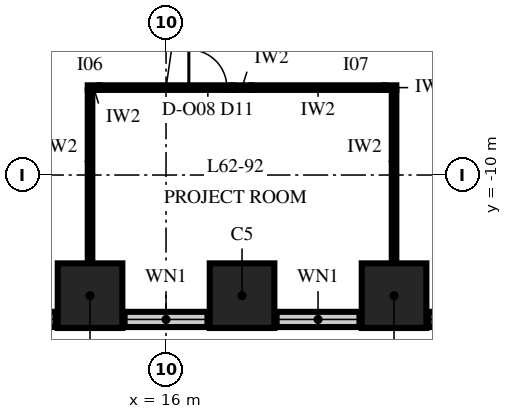
"""IFC4 building model, lengths in metres.
Left out: names, types, materials, properties, quantities, classifications, styles, units other than length and angle.
Written with IfcOpenShell. Run it as: python <this file> out.ifc"""

import sys

from ifc_helpers import new_model, si_unit, direction, frame, frame_2d, origin, origin_2d, place, context, subcontext, project, spatial, rectangle, extrude, element, fill, save


model = new_model("IFC4")
c1 = context("Model", 3, precision=1e-05, world=origin(), true_north=direction((0.0, 1.0)))
c2 = subcontext(c1, "Body", "Model", "MODEL_VIEW")
j1 = project(units=[si_unit("LENGTHUNIT", "METRE"), si_unit("PLANEANGLEUNIT", "RADIAN")], contexts=[c1])
p1 = place(None, origin())
s1 = spatial("IfcSite", under=j1, at=p1, CompositionType="ELEMENT")
p2 = place(p1, origin())
s2 = spatial("IfcBuilding", under=s1, at=p2, CompositionType="ELEMENT")
p3 = place(p2, frame((0.0, 0.0, 268.0)))
s3 = spatial("IfcBuildingStorey", under=s2, at=p3, CompositionType="ELEMENT", Elevation=268.0)
for number, where, z_axis, x_axis in (
    (1, (14.0, -13.175, 0.0), (0.0, 0.0, 1.0), (1.0, 0.0, 0.0)),
    (2, (18.0, -13.175, 0.0), (0.0, 0.0, 1.0), (1.0, 0.0, 0.0)),
    (3, (22.0, -13.175, 0.0), (0.0, 0.0, 1.0), (1.0, 0.0, 0.0)),
):
    element("IfcColumn", number, at=place(p3, frame(where, z_axis=z_axis, x_axis=x_axis)), inside=s3, PredefinedType="COLUMN", context=c2, shape_type="SweptSolid", body=[
        extrude(rectangle(XDim=1.7, YDim=1.7, at=origin_2d()), origin(), (0.0, 0.0, 1.0), 3.75),
    ])
p4 = place(p3, frame((-26.0, -13.8, 0.0), z_axis=(0.0, 0.0, 1.0), x_axis=(1.0, 0.0, 0.0)))
e4 = element("IfcWall", 4, at=p4, inside=s3, PredefinedType="SOLIDWALL", context=c2, shape_type="SweptSolid", body=[
    extrude(rectangle(XDim=52.0, YDim=0.4, at=frame_2d((26.0, 0.0))), origin(), (0.0, 0.0, 1.0), 2.0),
])
p5 = place(p4, frame((0.95, 0.0, 0.8)))
e5 = element("IfcOpeningElement", 5, at=p5, cuts=e4, PredefinedType="OPENING", context=c2, shape_type="SweptSolid", body=[
    extrude(rectangle(XDim=2.1, YDim=1.15, at=frame_2d((1.05, 0.575))), frame((0.0, 0.215, 0.0), z_axis=(0.0, -1.0, 0.0), x_axis=(1.0, 0.0, 0.0)), (0.0, 0.0, 1.0), 0.43),
])
p6 = place(p4, frame((4.95, 0.0, 0.8)))
e6 = element("IfcOpeningElement", 6, at=p6, cuts=e4, PredefinedType="OPENING", context=c2, shape_type="SweptSolid", body=[
    extrude(rectangle(XDim=2.1, YDim=1.15, at=frame_2d((1.05, 0.575))), frame((0.0, 0.215, 0.0), z_axis=(0.0, -1.0, 0.0), x_axis=(1.0, 0.0, 0.0)), (0.0, 0.0, 1.0), 0.43),
])
p7 = place(p4, frame((8.95, 0.0, 0.8)))
e7 = element("IfcOpeningElement", 7, at=p7, cuts=e4, PredefinedType="OPENING", context=c2, shape_type="SweptSolid", body=[
    extrude(rectangle(XDim=2.1, YDim=1.15, at=frame_2d((1.05, 0.575))), frame((0.0, 0.215, 0.0), z_axis=(0.0, -1.0, 0.0), x_axis=(1.0, 0.0, 0.0)), (0.0, 0.0, 1.0), 0.43),
])
p8 = place(p4, frame((12.95, 0.0, 0.8)))
e8 = element("IfcOpeningElement", 8, at=p8, cuts=e4, PredefinedType="OPENING", context=c2, shape_type="SweptSolid", body=[
    extrude(rectangle(XDim=2.1, YDim=1.15, at=frame_2d((1.05, 0.575))), frame((0.0, 0.215, 0.0), z_axis=(0.0, -1.0, 0.0), x_axis=(1.0, 0.0, 0.0)), (0.0, 0.0, 1.0), 0.43),
])
p9 = place(p4, frame((16.95, 0.0, 0.8)))
e9 = element("IfcOpeningElement", 9, at=p9, cuts=e4, PredefinedType="OPENING", context=c2, shape_type="SweptSolid", body=[
    extrude(rectangle(XDim=2.1, YDim=1.15, at=frame_2d((1.05, 0.575))), frame((0.0, 0.215, 0.0), z_axis=(0.0, -1.0, 0.0), x_axis=(1.0, 0.0, 0.0)), (0.0, 0.0, 1.0), 0.43),
])
p10 = place(p4, frame((20.95, 0.0, 0.8)))
e10 = element("IfcOpeningElement", 10, at=p10, cuts=e4, PredefinedType="OPENING", context=c2, shape_type="SweptSolid", body=[
    extrude(rectangle(XDim=2.1, YDim=1.15, at=frame_2d((1.05, 0.575))), frame((0.0, 0.215, 0.0), z_axis=(0.0, -1.0, 0.0), x_axis=(1.0, 0.0, 0.0)), (0.0, 0.0, 1.0), 0.43),
])
p11 = place(p4, frame((24.95, 0.0, 0.8)))
e11 = element("IfcOpeningElement", 11, at=p11, cuts=e4, PredefinedType="OPENING", context=c2, shape_type="SweptSolid", body=[
    extrude(rectangle(XDim=2.1, YDim=1.15, at=frame_2d((1.05, 0.575))), frame((0.0, 0.215, 0.0), z_axis=(0.0, -1.0, 0.0), x_axis=(1.0, 0.0, 0.0)), (0.0, 0.0, 1.0), 0.43),
])
p12 = place(p4, frame((28.95, 0.0, 0.8)))
e12 = element("IfcOpeningElement", 12, at=p12, cuts=e4, PredefinedType="OPENING", context=c2, shape_type="SweptSolid", body=[
    extrude(rectangle(XDim=2.1, YDim=1.15, at=frame_2d((1.05, 0.575))), frame((0.0, 0.215, 0.0), z_axis=(0.0, -1.0, 0.0), x_axis=(1.0, 0.0, 0.0)), (0.0, 0.0, 1.0), 0.43),
])
p13 = place(p4, frame((32.95, 0.0, 0.8)))
e13 = element("IfcOpeningElement", 13, at=p13, cuts=e4, PredefinedType="OPENING", context=c2, shape_type="SweptSolid", body=[
    extrude(rectangle(XDim=2.1, YDim=1.15, at=frame_2d((1.05, 0.575))), frame((0.0, 0.215, 0.0), z_axis=(0.0, -1.0, 0.0), x_axis=(1.0, 0.0, 0.0)), (0.0, 0.0, 1.0), 0.43),
])
p14 = place(p4, frame((36.95, 0.0, 0.8)))
e14 = element("IfcOpeningElement", 14, at=p14, cuts=e4, PredefinedType="OPENING", context=c2, shape_type="SweptSolid", body=[
    extrude(rectangle(XDim=2.1, YDim=1.15, at=frame_2d((1.05, 0.575))), frame((0.0, 0.215, 0.0), z_axis=(0.0, -1.0, 0.0), x_axis=(1.0, 0.0, 0.0)), (0.0, 0.0, 1.0), 0.43),
])
p15 = place(p4, frame((40.95, 0.0, 0.8)))
e15 = element("IfcOpeningElement", 15, at=p15, cuts=e4, PredefinedType="OPENING", context=c2, shape_type="SweptSolid", body=[
    extrude(rectangle(XDim=2.1, YDim=1.15, at=frame_2d((1.05, 0.575))), frame((0.0, 0.215, 0.0), z_axis=(0.0, -1.0, 0.0), x_axis=(1.0, 0.0, 0.0)), (0.0, 0.0, 1.0), 0.43),
])
p16 = place(p4, frame((44.95, 0.0, 0.8)))
e16 = element("IfcOpeningElement", 16, at=p16, cuts=e4, PredefinedType="OPENING", context=c2, shape_type="SweptSolid", body=[
    extrude(rectangle(XDim=2.1, YDim=1.15, at=frame_2d((1.05, 0.575))), frame((0.0, 0.215, 0.0), z_axis=(0.0, -1.0, 0.0), x_axis=(1.0, 0.0, 0.0)), (0.0, 0.0, 1.0), 0.43),
])
p17 = place(p4, frame((48.95, 0.0, 0.8)))
e17 = element("IfcOpeningElement", 17, at=p17, cuts=e4, PredefinedType="OPENING", context=c2, shape_type="SweptSolid", body=[
    extrude(rectangle(XDim=2.1, YDim=1.15, at=frame_2d((1.05, 0.575))), frame((0.0, 0.215, 0.0), z_axis=(0.0, -1.0, 0.0), x_axis=(1.0, 0.0, 0.0)), (0.0, 0.0, 1.0), 0.43),
])
p18 = place(p3, frame((13.94, -7.7, 0.0), z_axis=(0.0, 0.0, 1.0), x_axis=(1.0, 0.0, 0.0)))
e18 = element("IfcWall", 18, at=p18, inside=s3, PredefinedType="PARTITIONING", context=c2, shape_type="SweptSolid", body=[
    extrude(rectangle(XDim=0.31, YDim=0.12, at=frame_2d((0.155, 0.0))), origin(), (0.0, 0.0, 1.0), 2.15),
])
p19 = place(p3, frame((14.25, -7.7, 0.0), z_axis=(0.0, 0.0, 1.0), x_axis=(1.0, 0.0, 0.0)))
e19 = element("IfcWall", 19, at=p19, inside=s3, PredefinedType="PARTITIONING", context=c2, shape_type="SweptSolid", body=[
    extrude(rectangle(XDim=3.5, YDim=0.12, at=frame_2d((1.75, 0.0))), origin(), (0.0, 0.0, 1.0), 3.85),
])
p20 = place(p19, frame((2.35, 0.0, 0.0)))
e20 = element("IfcOpeningElement", 20, at=p20, cuts=e19, PredefinedType="OPENING", context=c2, shape_type="SweptSolid", body=[
    extrude(rectangle(XDim=1.0, YDim=2.4, at=frame_2d((0.5, 1.2))), frame((0.0, 0.075, 0.0), z_axis=(0.0, -1.0, 0.0), x_axis=(1.0, 0.0, 0.0)), (0.0, 0.0, 1.0), 0.15),
])
p21 = place(p3, frame((17.75, -7.7, 0.0), z_axis=(0.0, 0.0, 1.0), x_axis=(1.0, 0.0, 0.0)))
e21 = element("IfcWall", 21, at=p21, inside=s3, PredefinedType="PARTITIONING", context=c2, shape_type="SweptSolid", body=[
    extrude(rectangle(XDim=0.5, YDim=0.12, at=frame_2d((0.25, 0.0))), origin(), (0.0, 0.0, 1.0), 2.15),
])
p22 = place(p3, frame((18.25, -7.7, 0.0), z_axis=(0.0, 0.0, 1.0), x_axis=(1.0, 0.0, 0.0)))
e22 = element("IfcWall", 22, at=p22, inside=s3, PredefinedType="PARTITIONING", context=c2, shape_type="SweptSolid", body=[
    extrude(rectangle(XDim=3.5, YDim=0.12, at=frame_2d((1.75, 0.0))), origin(), (0.0, 0.0, 1.0), 3.85),
])
p23 = place(p3, frame((21.75, -7.7, 0.0), z_axis=(0.0, 0.0, 1.0), x_axis=(1.0, 0.0, 0.0)))
e23 = element("IfcWall", 23, at=p23, inside=s3, PredefinedType="PARTITIONING", context=c2, shape_type="SweptSolid", body=[
    extrude(rectangle(XDim=0.31, YDim=0.12, at=frame_2d((0.155, 0.0))), origin(), (0.0, 0.0, 1.0), 2.15),
])
for number, where, z_axis, x_axis in (
    (24, (14.0, -12.325, 0.0), (0.0, 0.0, 1.0), (0.0, 1.0, 0.0)),
    (25, (22.0, -12.325, 0.0), (0.0, 0.0, 1.0), (0.0, 1.0, 0.0)),
):
    element("IfcWall", number, at=place(p3, frame(where, z_axis=z_axis, x_axis=x_axis)), inside=s3, PredefinedType="PARTITIONING", context=c2, shape_type="SweptSolid", body=[
        extrude(rectangle(XDim=4.565, YDim=0.12, at=frame_2d((2.282, 0.0))), origin(), (0.0, 0.0, 1.0), 2.15),
    ])
p24 = place(p14, origin())
e26 = element("IfcWindow", 26, at=p24, inside=s3, PartitioningType="SINGLE_PANEL", PredefinedType="WINDOW", context=c2, shape_type="SweptSolid", body=[
    extrude(rectangle(XDim=2.1, YDim=1.15, at=frame_2d((1.05, 0.575))), frame((0.0, 0.03, 0.0), z_axis=(0.0, -1.0, 0.0), x_axis=(1.0, 0.0, 0.0)), (0.0, 0.0, 1.0), 0.06),
])
fill(e14, e26)
p25 = place(p15, origin())
e27 = element("IfcWindow", 27, at=p25, inside=s3, PartitioningType="SINGLE_PANEL", PredefinedType="WINDOW", context=c2, shape_type="SweptSolid", body=[
    extrude(rectangle(XDim=2.1, YDim=1.15, at=frame_2d((1.05, 0.575))), frame((0.0, 0.03, 0.0), z_axis=(0.0, -1.0, 0.0), x_axis=(1.0, 0.0, 0.0)), (0.0, 0.0, 1.0), 0.06),
])
fill(e15, e27)
p26 = place(p16, origin())
e28 = element("IfcWindow", 28, at=p26, inside=s3, PartitioningType="SINGLE_PANEL", PredefinedType="WINDOW", context=c2, shape_type="SweptSolid", body=[
    extrude(rectangle(XDim=2.1, YDim=1.15, at=frame_2d((1.05, 0.575))), frame((0.0, 0.03, 0.0), z_axis=(0.0, -1.0, 0.0), x_axis=(1.0, 0.0, 0.0)), (0.0, 0.0, 1.0), 0.06),
])
fill(e16, e28)
p27 = place(p17, origin())
e29 = element("IfcWindow", 29, at=p27, inside=s3, PartitioningType="SINGLE_PANEL", PredefinedType="WINDOW", context=c2, shape_type="SweptSolid", body=[
    extrude(rectangle(XDim=2.1, YDim=1.15, at=frame_2d((1.05, 0.575))), frame((0.0, 0.03, 0.0), z_axis=(0.0, -1.0, 0.0), x_axis=(1.0, 0.0, 0.0)), (0.0, 0.0, 1.0), 0.06),
])
fill(e17, e29)
p28 = place(p20, origin())
e30 = element("IfcDoor", 30, at=p28, inside=s3, OperationType="SINGLE_SWING_RIGHT", PredefinedType="DOOR", context=c2, shape_type="SweptSolid", body=[
    extrude(rectangle(XDim=1.0, YDim=2.4, at=frame_2d((0.5, 1.2))), frame((0.0, 0.06, 0.0), z_axis=(0.0, -1.0, 0.0), x_axis=(1.0, 0.0, 0.0)), (0.0, 0.0, 1.0), 0.12),
])
fill(e20, e30)
save(model, sys.argv[1])
